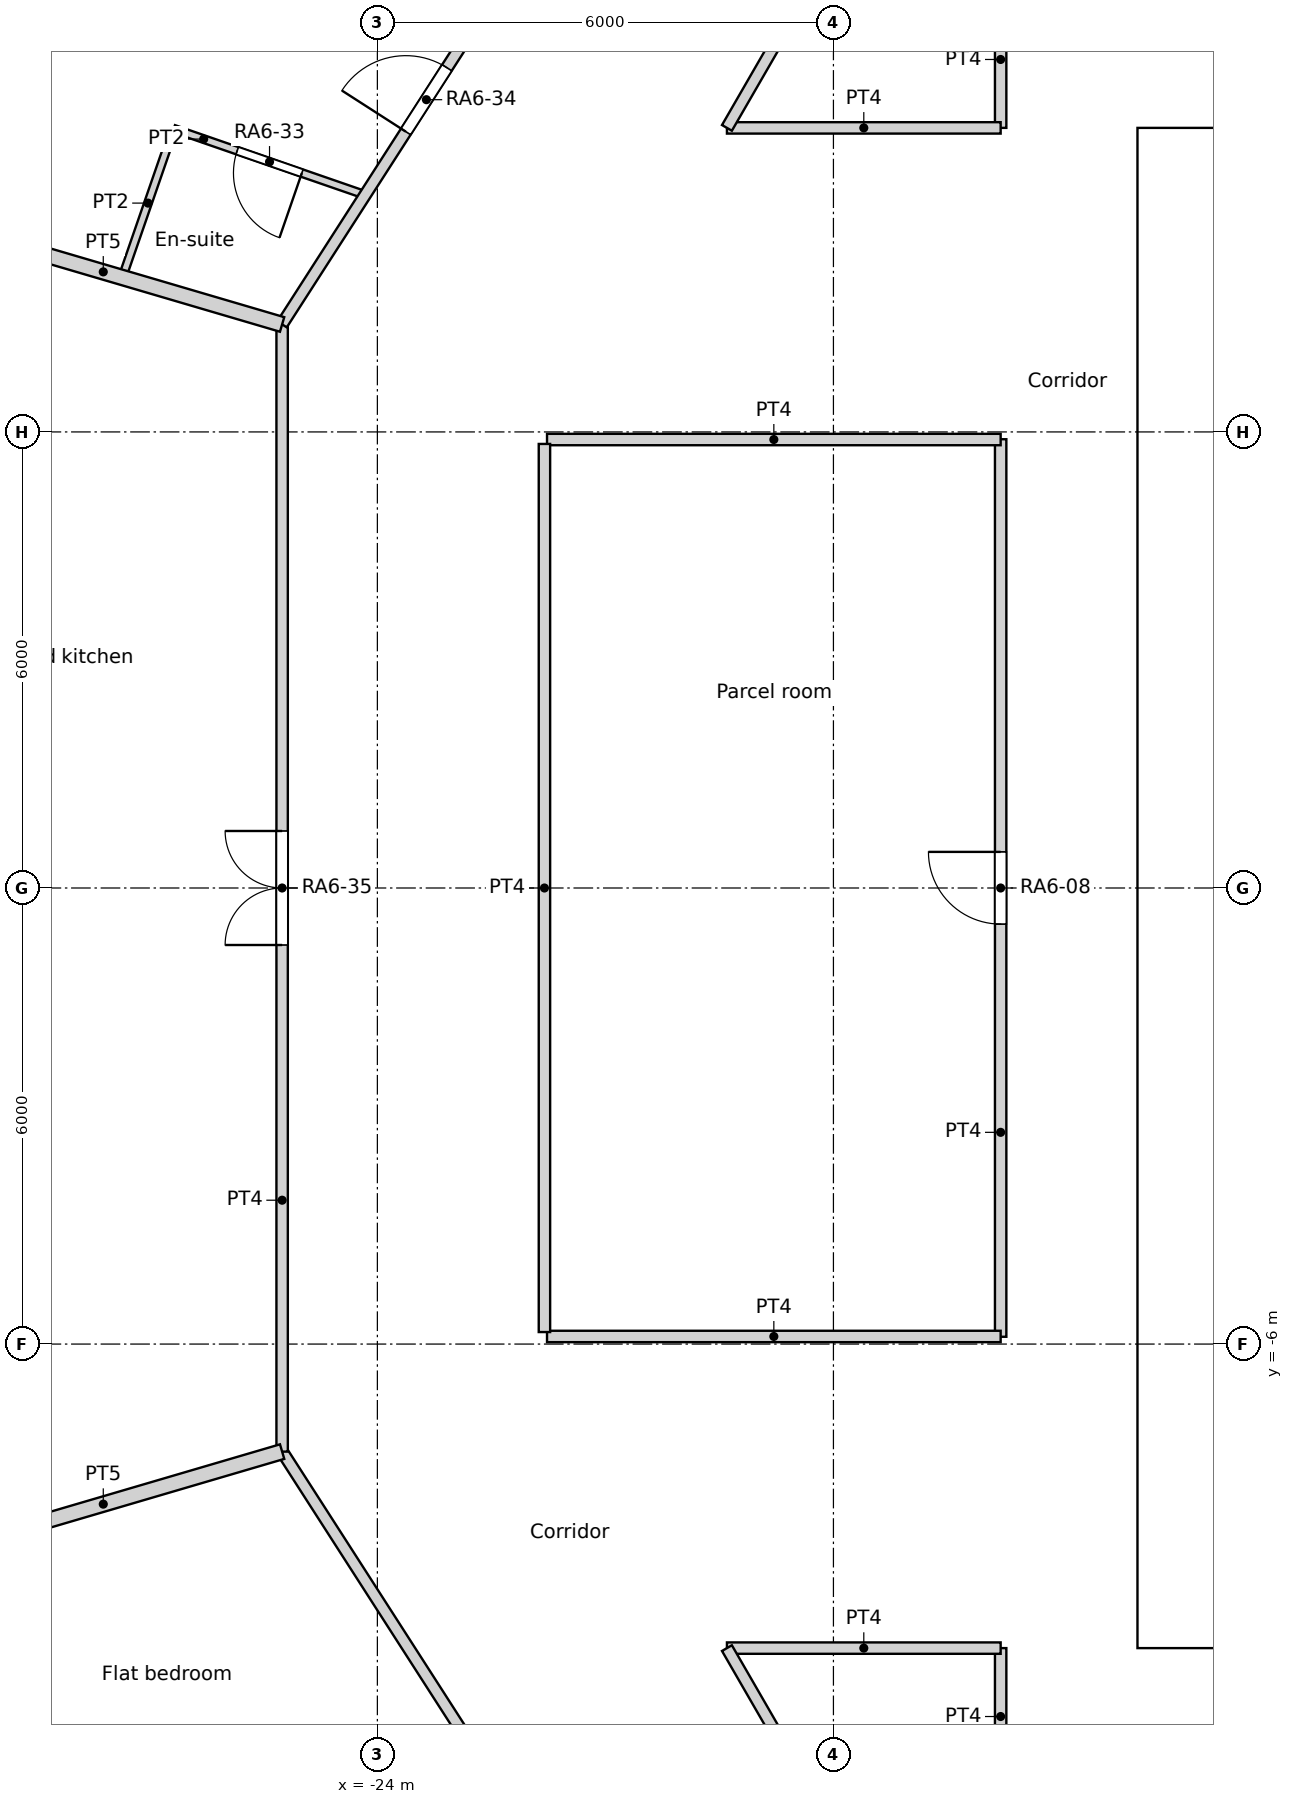
"""IFC4 building model, lengths in metres.
Left out: names, types, materials, properties, quantities, classifications, styles, units other than length and angle.
Written with IfcOpenShell. Run it as: python <this file> out.ifc"""

import sys

from ifc_helpers import new_model, si_unit, direction, frame, frame_2d, origin, origin_2d, place, context, subcontext, project, spatial, rectangle, circle, extrude, element, fill, save


model = new_model("IFC4")
c1 = context("Model", 3, precision=1e-05, world=origin(), true_north=direction((0.0, 1.0)))
c2 = subcontext(c1, "Body", "Model", "MODEL_VIEW")
j1 = project(units=[si_unit("LENGTHUNIT", "METRE"), si_unit("PLANEANGLEUNIT", "RADIAN")], contexts=[c1])
p1 = place(None, origin())
s1 = spatial("IfcSite", under=j1, at=p1, CompositionType="ELEMENT")
p2 = place(p1, origin())
s2 = spatial("IfcBuilding", under=s1, at=p2, CompositionType="ELEMENT")
p3 = place(p2, frame((0.0, 0.0, 82.2)))
s3 = spatial("IfcBuildingStorey", under=s2, at=p3, CompositionType="ELEMENT", Elevation=82.2)
for number, where, z_axis, x_axis in (
    (1, (-23.067, 8.396, 0.0), (0.0, 0.0, 1.0), (1.0, 0.0, 0.0)),
    (2, (-24.382, 2.85, 0.0), (0.0, 0.0, 1.0), (1.0, 0.0, 0.0)),
    (3, (-24.382, -2.85, 0.0), (0.0, 0.0, 1.0), (1.0, 0.0, 0.0)),
    (4, (-23.067, -8.396, 0.0), (0.0, 0.0, 1.0), (1.0, 0.0, 0.0)),
):
    element("IfcColumn", number, at=place(p3, frame(where, z_axis=z_axis, x_axis=x_axis)), inside=s3, PredefinedType="COLUMN", context=c2, shape_type="SweptSolid", body=[
        extrude(circle(Radius=0.65, at=origin_2d()), origin(), (0.0, 0.0, 1.0), 3.6),
    ])
for number, where, z_axis, x_axis in (
    (5, (-16.958, 8.167, 0.0), (0.0, 0.0, 1.0), (1.0, 0.0, 0.0)),
    (6, (-18.612, 2.805, 0.0), (0.0, 0.0, 1.0), (1.0, 0.0, 0.0)),
    (7, (-18.612, -2.805, 0.0), (0.0, 0.0, 1.0), (1.0, 0.0, 0.0)),
    (8, (-16.958, -8.167, 0.0), (0.0, 0.0, 1.0), (1.0, 0.0, 0.0)),
):
    element("IfcColumn", number, at=place(p3, frame(where, z_axis=z_axis, x_axis=x_axis)), inside=s3, PredefinedType="COLUMN", context=c2, shape_type="SweptSolid", body=[
        extrude(circle(Radius=0.7, at=origin_2d()), origin(), (0.0, 0.0, 1.0), 3.6),
    ])
p4 = place(p3, frame((-14.0, -9.4, 0.0), z_axis=(0.0, 0.0, 1.0), x_axis=(1.0, 0.0, 0.0)))
e9 = element("IfcWall", 9, at=p4, inside=s3, PredefinedType="SOLIDWALL", context=c2, shape_type="SweptSolid", body=[
    extrude(rectangle(XDim=28.0, YDim=1.2, at=frame_2d((14.0, 0.0))), origin(), (0.0, 0.0, 1.0), 3.6),
])
p5 = place(p4, frame((14.9, 0.0, 0.0)))
e10 = element("IfcOpeningElement", 10, at=p5, cuts=e9, PredefinedType="OPENING", context=c2, shape_type="SweptSolid", body=[
    extrude(rectangle(XDim=1.0, YDim=2.1, at=frame_2d((0.5, 1.05))), frame((0.0, 0.6, 0.0), z_axis=(0.0, -1.0, 0.0), x_axis=(1.0, 0.0, 0.0)), (0.0, 0.0, 1.0), 1.2),
])
p6 = place(p4, frame((9.8, 0.0, 0.0)))
e11 = element("IfcOpeningElement", 11, at=p6, cuts=e9, PredefinedType="OPENING", context=c2, shape_type="SweptSolid", body=[
    extrude(rectangle(XDim=1.8, YDim=2.1, at=frame_2d((0.9, 1.05))), frame((0.0, 0.6, 0.0), z_axis=(0.0, -1.0, 0.0), x_axis=(1.0, 0.0, 0.0)), (0.0, 0.0, 1.0), 1.2),
])
p7 = place(p4, frame((16.4, 0.0, 0.0)))
e12 = element("IfcOpeningElement", 12, at=p7, cuts=e9, PredefinedType="OPENING", context=c2, shape_type="SweptSolid", body=[
    extrude(rectangle(XDim=1.8, YDim=2.1, at=frame_2d((0.9, 1.05))), frame((0.0, 0.6, 0.0), z_axis=(0.0, -1.0, 0.0), x_axis=(1.0, 0.0, 0.0)), (0.0, 0.0, 1.0), 1.2),
])
p8 = place(p3, frame((-14.0, 9.4, 0.0), z_axis=(0.0, 0.0, 1.0), x_axis=(1.0, 0.0, 0.0)))
e13 = element("IfcWall", 13, at=p8, inside=s3, PredefinedType="SOLIDWALL", context=c2, shape_type="SweptSolid", body=[
    extrude(rectangle(XDim=28.0, YDim=1.2, at=frame_2d((14.0, 0.0))), origin(), (0.0, 0.0, 1.0), 3.6),
])
p9 = place(p8, frame((9.8, 0.0, 0.0)))
e14 = element("IfcOpeningElement", 14, at=p9, cuts=e13, PredefinedType="OPENING", context=c2, shape_type="SweptSolid", body=[
    extrude(rectangle(XDim=1.8, YDim=2.1, at=frame_2d((0.9, 1.05))), frame((0.0, 0.6, 0.0), z_axis=(0.0, -1.0, 0.0), x_axis=(1.0, 0.0, 0.0)), (0.0, 0.0, 1.0), 1.2),
])
p10 = place(p3, frame((-13.4, -8.8, 0.0), z_axis=(0.0, 0.0, 1.0), x_axis=(0.0, 1.0, 0.0)))
e15 = element("IfcWall", 15, at=p10, inside=s3, PredefinedType="SOLIDWALL", context=c2, shape_type="SweptSolid", body=[
    extrude(rectangle(XDim=17.6, YDim=1.2, at=frame_2d((8.8, 0.0))), origin(), (0.0, 0.0, 1.0), 3.6),
])
p11 = place(p10, frame((5.2, 0.0, 0.0)))
e16 = element("IfcOpeningElement", 16, at=p11, cuts=e15, PredefinedType="OPENING", context=c2, shape_type="SweptSolid", body=[
    extrude(rectangle(XDim=1.0, YDim=2.1, at=frame_2d((0.5, 1.05))), frame((0.0, 0.6, 0.0), z_axis=(0.0, -1.0, 0.0), x_axis=(1.0, 0.0, 0.0)), (0.0, 0.0, 1.0), 1.2),
])
p12 = place(p10, frame((11.4, 0.0, 0.0)))
e17 = element("IfcOpeningElement", 17, at=p12, cuts=e15, PredefinedType="OPENING", context=c2, shape_type="SweptSolid", body=[
    extrude(rectangle(XDim=1.0, YDim=2.1, at=frame_2d((0.5, 1.05))), frame((0.0, 0.6, 0.0), z_axis=(0.0, -1.0, 0.0), x_axis=(1.0, 0.0, 0.0)), (0.0, 0.0, 1.0), 1.2),
])
for number, where, z_axis, x_axis in (
    (18, (-15.8, 10.0, 0.0), (0.0, 0.0, 1.0), (0.0, 1.0, 0.0)),
    (19, (-15.8, -11.8, 0.0), (0.0, 0.0, 1.0), (0.0, 1.0, 0.0)),
):
    element("IfcWall", number, at=place(p3, frame(where, z_axis=z_axis, x_axis=x_axis)), inside=s3, PredefinedType="PARTITIONING", context=c2, shape_type="SweptSolid", body=[
        extrude(rectangle(XDim=1.8, YDim=0.15, at=frame_2d((0.9, 0.0))), origin(), (0.0, 0.0, 1.0), 3.15),
    ])
p13 = place(p3, frame((-15.8, -5.904, 0.0), z_axis=(0.0, 0.0, 1.0), x_axis=(0.0, 1.0, 0.0)))
e20 = element("IfcWall", 20, at=p13, inside=s3, PredefinedType="PARTITIONING", context=c2, shape_type="SweptSolid", body=[
    extrude(rectangle(XDim=11.808, YDim=0.15, at=frame_2d((5.904, 0.0))), origin(), (0.0, 0.0, 1.0), 3.15),
])
p14 = place(p13, frame((5.429, 0.0, 0.0)))
e21 = element("IfcOpeningElement", 21, at=p14, cuts=e20, PredefinedType="OPENING", context=c2, shape_type="SweptSolid", body=[
    extrude(rectangle(XDim=0.95, YDim=2.1, at=frame_2d((0.475, 1.05))), frame((0.0, 0.075, 0.0), z_axis=(0.0, -1.0, 0.0), x_axis=(1.0, 0.0, 0.0)), (0.0, 0.0, 1.0), 0.15),
])
p15 = place(p3, frame((-25.255, 7.416, 0.0), z_axis=(0.0, 0.0, 1.0), x_axis=(0.540805851332, 0.841147449123, 0.0)))
e22 = element("IfcWall", 22, at=p15, inside=s3, PredefinedType="PARTITIONING", context=c2, shape_type="SweptSolid", body=[
    extrude(rectangle(XDim=14.829, YDim=0.15, at=frame_2d((7.415, 0.0))), origin(), (0.0, 0.0, 1.0), 3.15),
])
p16 = place(p15, frame((5.603, 0.0, 0.0)))
e23 = element("IfcOpeningElement", 23, at=p16, cuts=e22, PredefinedType="OPENING", context=c2, shape_type="SweptSolid", body=[
    extrude(rectangle(XDim=1.0, YDim=2.1, at=frame_2d((0.5, 1.05))), frame((0.0, 0.075, 0.0), z_axis=(0.0, -1.0, 0.0), x_axis=(1.0, 0.0, 0.0)), (0.0, 0.0, 1.0), 0.15),
])
p17 = place(p15, frame((3.013, 0.0, 0.0)))
e24 = element("IfcOpeningElement", 24, at=p17, cuts=e22, PredefinedType="OPENING", context=c2, shape_type="SweptSolid", body=[
    extrude(rectangle(XDim=1.0, YDim=2.1, at=frame_2d((0.5, 1.05))), frame((0.0, 0.075, 0.0), z_axis=(0.0, -1.0, 0.0), x_axis=(1.0, 0.0, 0.0)), (0.0, 0.0, 1.0), 0.15),
])
p18 = place(p3, frame((-21.768, 5.9, 0.0), z_axis=(0.0, 0.0, 1.0), x_axis=(1.0, 0.0, 0.0)))
e25 = element("IfcWall", 25, at=p18, inside=s3, PredefinedType="PARTITIONING", context=c2, shape_type="SweptSolid", body=[
    extrude(rectangle(XDim=5.968, YDim=0.15, at=frame_2d((2.984, 0.0))), origin(), (0.0, 0.0, 1.0), 3.15),
])
p19 = place(p3, frame((-21.802, -5.842, 0.0), z_axis=(0.0, 0.0, 1.0), x_axis=(0.0, 1.0, 0.0)))
e26 = element("IfcWall", 26, at=p19, inside=s3, PredefinedType="PARTITIONING", context=c2, shape_type="SweptSolid", body=[
    extrude(rectangle(XDim=11.684, YDim=0.15, at=frame_2d((5.842, 0.0))), origin(), (0.0, 0.0, 1.0), 3.15),
])
p20 = place(p3, frame((-21.768, -5.9, 0.0), z_axis=(0.0, 0.0, 1.0), x_axis=(1.0, 0.0, 0.0)))
e27 = element("IfcWall", 27, at=p20, inside=s3, PredefinedType="PARTITIONING", context=c2, shape_type="SweptSolid", body=[
    extrude(rectangle(XDim=5.968, YDim=0.15, at=frame_2d((2.984, 0.0))), origin(), (0.0, 0.0, 1.0), 3.15),
])
p21 = place(p3, frame((-19.401, -10.0, 0.0), z_axis=(0.0, 0.0, 1.0), x_axis=(1.0, 0.0, 0.0)))
e28 = element("IfcWall", 28, at=p21, inside=s3, PredefinedType="PARTITIONING", context=c2, shape_type="SweptSolid", body=[
    extrude(rectangle(XDim=3.601, YDim=0.15, at=frame_2d((1.8, 0.0))), origin(), (0.0, 0.0, 1.0), 3.15),
])
p22 = place(p3, frame((-19.401, -10.0, 0.0), z_axis=(0.0, 0.0, 1.0), x_axis=(0.499992689227, -0.86602962462, 0.0)))
e29 = element("IfcWall", 29, at=p22, inside=s3, PredefinedType="PARTITIONING", context=c2, shape_type="SweptSolid", body=[
    extrude(rectangle(XDim=6.882, YDim=0.15, at=frame_2d((3.441, 0.0))), origin(), (0.0, 0.0, 1.0), 3.15),
])
p23 = place(p22, frame((2.941, 0.0, 0.0)))
e30 = element("IfcOpeningElement", 30, at=p23, cuts=e29, PredefinedType="OPENING", context=c2, shape_type="SweptSolid", body=[
    extrude(rectangle(XDim=1.0, YDim=2.04, at=frame_2d((0.5, 1.02))), frame((0.0, 0.075, 0.0), z_axis=(0.0, -1.0, 0.0), x_axis=(1.0, 0.0, 0.0)), (0.0, 0.0, 1.0), 0.15),
])
p24 = place(p3, frame((-19.401, 10.0, 0.0), z_axis=(0.0, 0.0, 1.0), x_axis=(0.499992689227, 0.86602962462, 0.0)))
e31 = element("IfcWall", 31, at=p24, inside=s3, PredefinedType="PARTITIONING", context=c2, shape_type="SweptSolid", body=[
    extrude(rectangle(XDim=6.882, YDim=0.15, at=frame_2d((3.441, 0.0))), origin(), (0.0, 0.0, 1.0), 3.15),
])
p25 = place(p24, frame((2.941, 0.0, 0.0)))
e32 = element("IfcOpeningElement", 32, at=p25, cuts=e31, PredefinedType="OPENING", context=c2, shape_type="SweptSolid", body=[
    extrude(rectangle(XDim=1.0, YDim=2.04, at=frame_2d((0.5, 1.02))), frame((0.0, 0.075, 0.0), z_axis=(0.0, -1.0, 0.0), x_axis=(1.0, 0.0, 0.0)), (0.0, 0.0, 1.0), 0.15),
])
p26 = place(p3, frame((-19.401, 10.0, 0.0), z_axis=(0.0, 0.0, 1.0), x_axis=(1.0, 0.0, 0.0)))
e33 = element("IfcWall", 33, at=p26, inside=s3, PredefinedType="PARTITIONING", context=c2, shape_type="SweptSolid", body=[
    extrude(rectangle(XDim=3.601, YDim=0.15, at=frame_2d((1.8, 0.0))), origin(), (0.0, 0.0, 1.0), 3.15),
])
p27 = place(p3, frame((-25.253, -7.415, 0.0), z_axis=(0.0, 0.0, 1.0), x_axis=(0.0, 1.0, 0.0)))
e34 = element("IfcWall", 34, at=p27, inside=s3, PredefinedType="PARTITIONING", context=c2, shape_type="SweptSolid", body=[
    extrude(rectangle(XDim=14.83, YDim=0.15, at=frame_2d((7.415, 0.0))), origin(), (0.0, 0.0, 1.0), 3.15),
])
p28 = place(p27, frame((6.665, 0.0, 0.0)))
e35 = element("IfcOpeningElement", 35, at=p28, cuts=e34, PredefinedType="OPENING", context=c2, shape_type="SweptSolid", body=[
    extrude(rectangle(XDim=1.5, YDim=2.1, at=frame_2d((0.75, 1.05))), frame((0.0, 0.075, 0.0), z_axis=(0.0, -1.0, 0.0), x_axis=(1.0, 0.0, 0.0)), (0.0, 0.0, 1.0), 0.15),
])
p29 = place(p3, frame((-25.253, -7.415, 0.0), z_axis=(0.0, 0.0, 1.0), x_axis=(0.540667724156, -0.841236240337, 0.0)))
e36 = element("IfcWall", 36, at=p29, inside=s3, PredefinedType="PARTITIONING", context=c2, shape_type="SweptSolid", body=[
    extrude(rectangle(XDim=14.83, YDim=0.15, at=frame_2d((7.415, 0.0))), origin(), (0.0, 0.0, 1.0), 3.15),
])
p30 = place(p29, frame((5.602, 0.0, 0.0)))
e37 = element("IfcOpeningElement", 37, at=p30, cuts=e36, PredefinedType="OPENING", context=c2, shape_type="SweptSolid", body=[
    extrude(rectangle(XDim=1.0, YDim=2.1, at=frame_2d((0.5, 1.05))), frame((0.0, 0.075, 0.0), z_axis=(0.0, -1.0, 0.0), x_axis=(1.0, 0.0, 0.0)), (0.0, 0.0, 1.0), 0.15),
])
p31 = place(p3, frame((-26.679, 9.989, 0.0), z_axis=(0.0, 0.0, 1.0), x_axis=(0.945014370431, -0.327028805578, 0.0)))
e38 = element("IfcWall", 38, at=p31, inside=s3, PredefinedType="PARTITIONING", context=c2, shape_type="SweptSolid", body=[
    extrude(rectangle(XDim=2.667, YDim=0.1, at=frame_2d((1.333, 0.0))), origin(), (0.0, 0.0, 1.0), 3.15),
])
p32 = place(p31, frame((0.884, 0.0, 0.0)))
e39 = element("IfcOpeningElement", 39, at=p32, cuts=e38, PredefinedType="OPENING", context=c2, shape_type="SweptSolid", body=[
    extrude(rectangle(XDim=0.9, YDim=2.04, at=frame_2d((0.45, 1.02))), frame((0.0, 0.05, 0.0), z_axis=(0.0, -1.0, 0.0), x_axis=(1.0, 0.0, 0.0)), (0.0, 0.0, 1.0), 0.1),
])
p33 = place(p3, frame((-27.356, 8.032, 0.0), z_axis=(0.0, 0.0, 1.0), x_axis=(0.326924291943, 0.945050531632, 0.0)))
e40 = element("IfcWall", 40, at=p33, inside=s3, PredefinedType="PARTITIONING", context=c2, shape_type="SweptSolid", body=[
    extrude(rectangle(XDim=2.071, YDim=0.1, at=frame_2d((1.035, 0.0))), origin(), (0.0, 0.0, 1.0), 3.15),
])
p34 = place(p3, frame((-29.959, 8.797, 0.0), z_axis=(0.0, 0.0, 1.0), x_axis=(0.95941700717, -0.281991145876, 0.0)))
e41 = element("IfcWall", 41, at=p34, inside=s3, PredefinedType="PARTITIONING", context=c2, shape_type="SweptSolid", body=[
    extrude(rectangle(XDim=4.905, YDim=0.2, at=frame_2d((2.452, 0.0))), origin(), (0.0, 0.0, 1.0), 3.15),
])
p35 = place(p3, frame((-29.959, -8.797, 0.0), z_axis=(0.0, 0.0, 1.0), x_axis=(0.959478767209, 0.281780934902, 0.0)))
e42 = element("IfcWall", 42, at=p35, inside=s3, PredefinedType="PARTITIONING", context=c2, shape_type="SweptSolid", body=[
    extrude(rectangle(XDim=4.905, YDim=0.2, at=frame_2d((2.452, 0.0))), origin(), (0.0, 0.0, 1.0), 3.15),
])
p36 = place(p11, origin())
e43 = element("IfcDoor", 43, at=p36, inside=s3, OperationType="DOUBLE_DOOR_SINGLE_SWING", PredefinedType="DOOR", context=c2, shape_type="SweptSolid", body=[
    extrude(rectangle(XDim=1.0, YDim=2.1, at=frame_2d((0.5, 1.05))), frame((0.0, 0.025, 0.0), z_axis=(0.0, -1.0, 0.0), x_axis=(1.0, 0.0, 0.0)), (0.0, 0.0, 1.0), 0.05),
])
fill(e16, e43)
p37 = place(p12, origin())
e44 = element("IfcDoor", 44, at=p37, inside=s3, OperationType="DOUBLE_DOOR_SINGLE_SWING", PredefinedType="DOOR", context=c2, shape_type="SweptSolid", body=[
    extrude(rectangle(XDim=1.0, YDim=2.1, at=frame_2d((0.5, 1.05))), frame((0.0, 0.025, 0.0), z_axis=(0.0, -1.0, 0.0), x_axis=(1.0, 0.0, 0.0)), (0.0, 0.0, 1.0), 0.05),
])
fill(e17, e44)
p38 = place(p14, origin())
e45 = element("IfcDoor", 45, at=p38, inside=s3, OperationType="SINGLE_SWING_RIGHT", PredefinedType="DOOR", context=c2, shape_type="SweptSolid", body=[
    extrude(rectangle(XDim=0.95, YDim=2.1, at=frame_2d((0.475, 1.05))), frame((0.0, 0.025, 0.0), z_axis=(0.0, -1.0, 0.0), x_axis=(1.0, 0.0, 0.0)), (0.0, 0.0, 1.0), 0.05),
])
fill(e21, e45)
p39 = place(p32, origin())
e46 = element("IfcDoor", 46, at=p39, inside=s3, OperationType="SINGLE_SWING_LEFT", PredefinedType="DOOR", context=c2, shape_type="SweptSolid", body=[
    extrude(rectangle(XDim=0.9, YDim=2.04, at=frame_2d((0.45, 1.02))), frame((0.0, 0.025, 0.0), z_axis=(0.0, -1.0, 0.0), x_axis=(1.0, 0.0, 0.0)), (0.0, 0.0, 1.0), 0.05),
])
fill(e39, e46)
p40 = place(p17, origin())
e47 = element("IfcDoor", 47, at=p40, inside=s3, OperationType="SINGLE_SWING_LEFT", PredefinedType="DOOR", context=c2, shape_type="SweptSolid", body=[
    extrude(rectangle(XDim=1.0, YDim=2.1, at=frame_2d((0.5, 1.05))), frame((0.0, 0.025, 0.0), z_axis=(0.0, -1.0, 0.0), x_axis=(1.0, 0.0, 0.0)), (0.0, 0.0, 1.0), 0.05),
])
fill(e24, e47)
p41 = place(p28, origin())
e48 = element("IfcDoor", 48, at=p41, inside=s3, OperationType="DOUBLE_DOOR_SINGLE_SWING", PredefinedType="DOOR", context=c2, shape_type="SweptSolid", body=[
    extrude(rectangle(XDim=1.5, YDim=2.1, at=frame_2d((0.75, 1.05))), frame((0.0, 0.025, 0.0), z_axis=(0.0, -1.0, 0.0), x_axis=(1.0, 0.0, 0.0)), (0.0, 0.0, 1.0), 0.05),
])
fill(e35, e48)
save(model, sys.argv[1])
